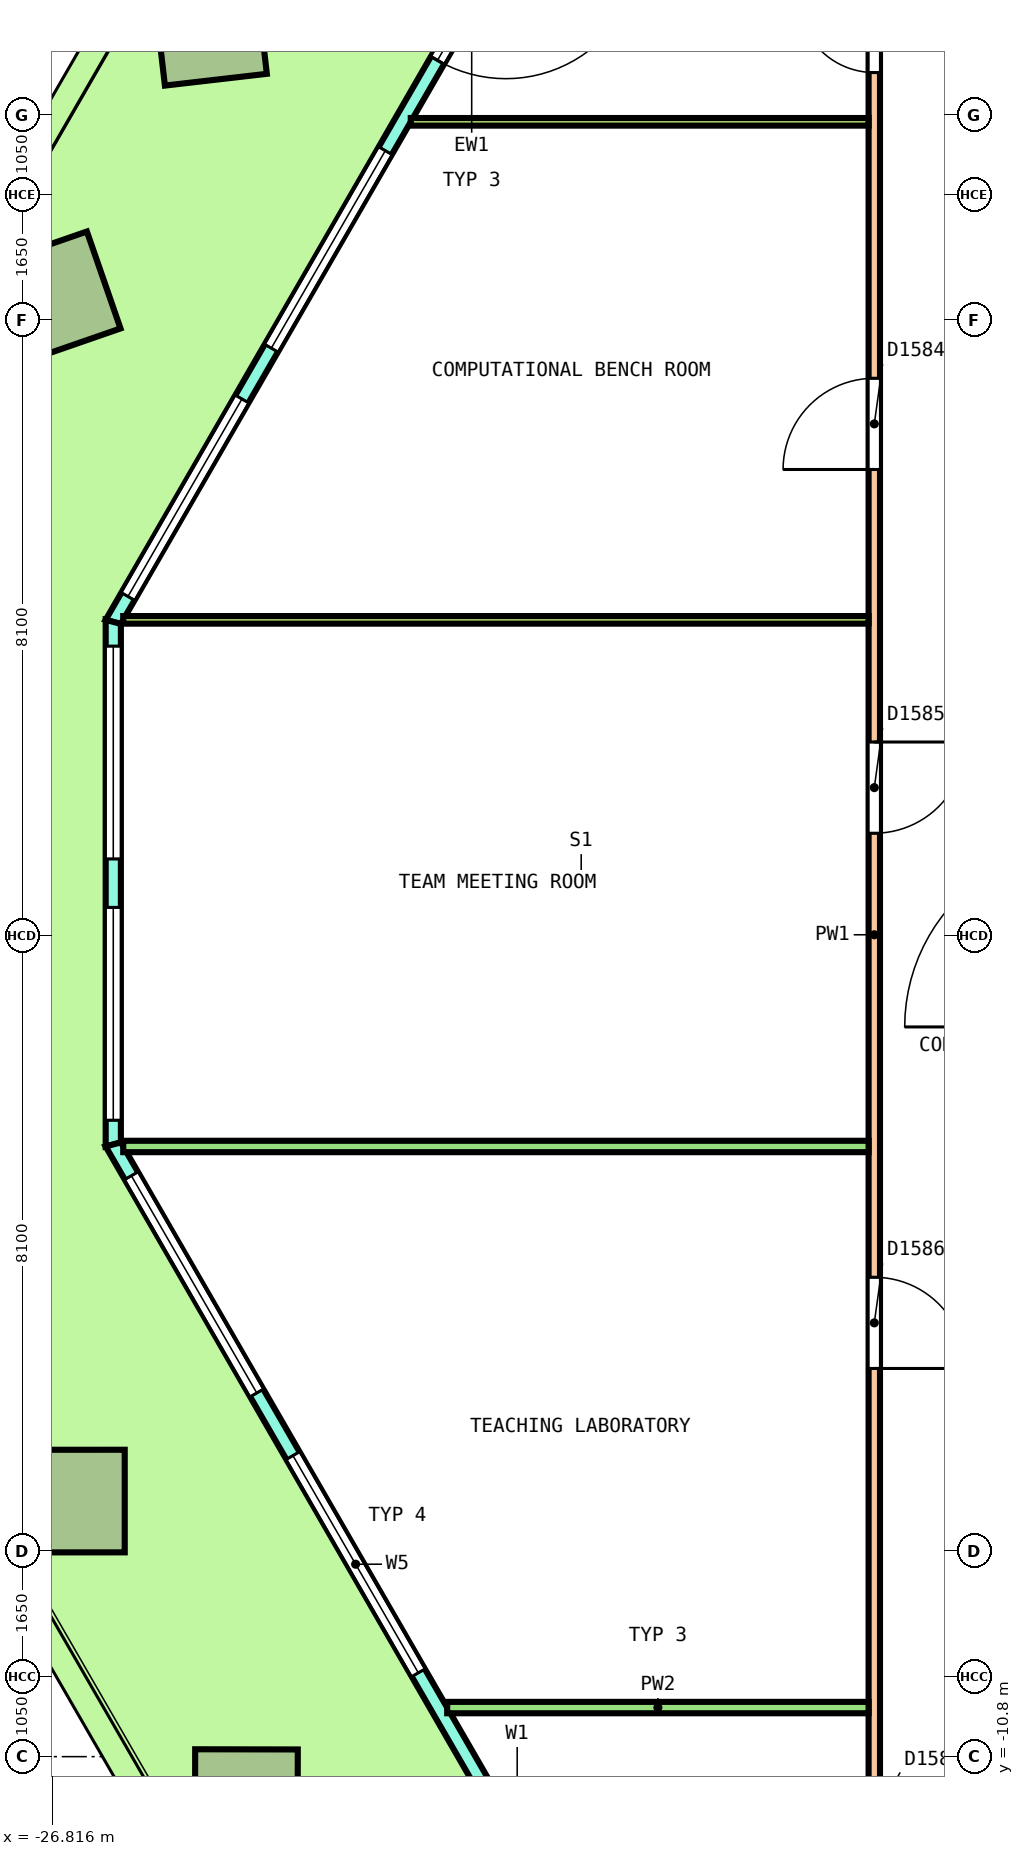
"""IFC4 building model, lengths in metres.
Left out: names, types, materials, properties, quantities, classifications, styles, units other than length and angle.
Written with IfcOpenShell. Run it as: python <this file> out.ifc"""

import sys

from ifc_helpers import new_model, si_unit, direction, frame, frame_2d, origin, origin_2d, place, context, subcontext, project, spatial, polyline, rectangle, outline, extrude, element, fill, save


model = new_model("IFC4")
c1 = context("Model", 3, precision=1e-05, world=origin(), true_north=direction((0.0, 1.0)))
c2 = subcontext(c1, "Body", "Model", "MODEL_VIEW")
j1 = project(units=[si_unit("LENGTHUNIT", "METRE"), si_unit("PLANEANGLEUNIT", "RADIAN")], contexts=[c1])
p1 = place(None, origin())
s1 = spatial("IfcSite", under=j1, at=p1, CompositionType="ELEMENT")
p2 = place(p1, origin())
s2 = spatial("IfcBuilding", under=s1, at=p2, CompositionType="ELEMENT")
p3 = place(p2, frame((0.0, 0.0, 102.8)))
s3 = spatial("IfcBuildingStorey", under=s2, at=p3, CompositionType="ELEMENT", Elevation=102.8)
p4 = place(p3, frame((-24.74, 11.932, 0.0), z_axis=(-0.025365582388, 0.018858497119, 0.999500347332), x_axis=(-0.500693070331, -0.865617296359, 0.003625681545)))
e1 = element("IfcColumn", 1, at=p4, inside=s3, PredefinedType="COLUMN", context=c2, shape_type="SweptSolid", body=[
    extrude(rectangle(XDim=1.35, YDim=1.35, at=origin_2d()), origin(), (0.0, 0.0, 1.0), 4.052),
])
p5 = place(p3, frame((-26.776, 8.406, 0.0), z_axis=(-0.021749357258, 0.025183466299, 0.999446225909), x_axis=(-0.501141721156, -0.865296605573, 0.010897692434)))
e2 = element("IfcColumn", 2, at=p5, inside=s3, PredefinedType="COLUMN", context=c2, shape_type="SweptSolid", body=[
    extrude(rectangle(XDim=1.35, YDim=1.35, at=origin_2d()), origin(), (0.0, 0.0, 1.0), 4.052),
])
p6 = place(p3, frame((-26.536, -7.438, 0.0), z_axis=(-0.010847994403, 0.018863456933, 0.999763217472), x_axis=(0.498562459177, -0.866580616749, 0.02176026136)))
e3 = element("IfcColumn", 3, at=p6, inside=s3, PredefinedType="COLUMN", context=c2, shape_type="SweptSolid", body=[
    extrude(rectangle(XDim=1.35, YDim=1.35, at=origin_2d()), origin(), (0.0, 0.0, 1.0), 4.051),
])
p7 = place(p3, frame((-24.261, -11.379, 0.0), z_axis=(-0.003616759812, 0.006269050341, 0.999973808685), x_axis=(0.498177152713, -0.867045063843, 0.007237525818)))
e4 = element("IfcColumn", 4, at=p7, inside=s3, PredefinedType="COLUMN", context=c2, shape_type="SweptSolid", body=[
    extrude(rectangle(XDim=1.35, YDim=1.35, at=origin_2d()), origin(), (0.0, 0.0, 1.0), 4.05),
])
p8 = place(p3, frame((-16.582, 20.463, 0.0), z_axis=(0.0, 0.0, 1.0), x_axis=(-0.499999588275, -0.866025641494, 0.0)))
e5 = element("IfcWall", 5, at=p8, inside=s3, PredefinedType="SOLIDWALL", context=c2, shape_type="SweptSolid", body=[
    extrude(outline(polyline([(-0.027, -0.1), (1.024, -0.1), (2.075, -0.1), (3.125, -0.1), (4.176, -0.1), (5.227, -0.1), (6.278, -0.1), (7.329, -0.1), (8.38, -0.1), (9.43, -0.1), (10.481, -0.1), (11.532, -0.1), (12.583, -0.1), (13.634, -0.1), (14.685, -0.1), (15.735, -0.1), (16.786, -0.1), (17.837, -0.1), (18.888, -0.1), (18.834, 0.1), (17.789, 0.1), (16.744, 0.1), (15.699, 0.1), (14.655, 0.1), (13.61, 0.1), (12.565, 0.1), (11.52, 0.1), (10.475, 0.1), (9.43, 0.1), (8.385, 0.1), (7.341, 0.1), (6.296, 0.1), (5.251, 0.1), (4.206, 0.1), (3.161, 0.1), (2.116, 0.1), (1.072, 0.1), (0.027, 0.1), (-0.027, -0.1)])), origin(), (0.0, 0.0, 1.0), 4.1),
])
p9 = place(p8, frame((0.386, 0.0, 0.1)))
e6 = element("IfcOpeningElement", 6, at=p9, cuts=e5, PredefinedType="OPENING", context=c2, shape_type="SweptSolid", body=[
    extrude(rectangle(XDim=3.0, YDim=2.9, at=frame_2d((1.5, 1.45))), frame((0.0, 0.11, 0.0), z_axis=(0.0, -1.0, 0.0), x_axis=(1.0, 0.0, 0.0)), (0.0, 0.0, 1.0), 0.22),
])
p10 = place(p8, frame((4.158, 0.0, 0.1)))
e7 = element("IfcOpeningElement", 7, at=p10, cuts=e5, PredefinedType="OPENING", context=c2, shape_type="SweptSolid", body=[
    extrude(rectangle(XDim=3.0, YDim=2.9, at=frame_2d((1.5, 1.45))), frame((0.0, 0.11, 0.0), z_axis=(0.0, -1.0, 0.0), x_axis=(1.0, 0.0, 0.0)), (0.0, 0.0, 1.0), 0.22),
])
p11 = place(p8, frame((8.531, 0.0, 0.0)))
e8 = element("IfcOpeningElement", 8, at=p11, cuts=e5, PredefinedType="OPENING", context=c2, shape_type="SweptSolid", body=[
    extrude(rectangle(XDim=1.8, YDim=2.4, at=frame_2d((0.9, 1.2))), frame((0.0, 0.11, 0.0), z_axis=(0.0, -1.0, 0.0), x_axis=(1.0, 0.0, 0.0)), (0.0, 0.0, 1.0), 0.22),
])
p12 = place(p8, frame((8.531, 0.0, 2.55)))
e9 = element("IfcOpeningElement", 9, at=p12, cuts=e5, PredefinedType="OPENING", context=c2, shape_type="SweptSolid", body=[
    extrude(rectangle(XDim=1.8, YDim=0.45, at=frame_2d((0.9, 0.225))), frame((0.0, 0.11, 0.0), z_axis=(0.0, -1.0, 0.0), x_axis=(1.0, 0.0, 0.0)), (0.0, 0.0, 1.0), 0.22),
])
p13 = place(p8, frame((11.703, 0.0, 0.1)))
e10 = element("IfcOpeningElement", 10, at=p13, cuts=e5, PredefinedType="OPENING", context=c2, shape_type="SweptSolid", body=[
    extrude(rectangle(XDim=3.0, YDim=2.9, at=frame_2d((1.5, 1.45))), frame((0.0, 0.11, 0.0), z_axis=(0.0, -1.0, 0.0), x_axis=(1.0, 0.0, 0.0)), (0.0, 0.0, 1.0), 0.22),
])
p14 = place(p8, frame((15.475, 0.0, 0.1)))
e11 = element("IfcOpeningElement", 11, at=p14, cuts=e5, PredefinedType="OPENING", context=c2, shape_type="SweptSolid", body=[
    extrude(rectangle(XDim=3.0, YDim=2.9, at=frame_2d((1.5, 1.45))), frame((0.0, 0.11, 0.0), z_axis=(0.0, -1.0, 0.0), x_axis=(1.0, 0.0, 0.0)), (0.0, 0.0, 1.0), 0.22),
])
p15 = place(p3, frame((-26.012, 4.129, 0.0), z_axis=(0.0, 0.0, 1.0), x_axis=(0.0, -1.0, 0.0)))
e12 = element("IfcWall", 12, at=p15, inside=s3, PredefinedType="SOLIDWALL", context=c2, shape_type="SweptSolid", body=[
    extrude(outline(polyline([(-0.027, -0.1), (1.128, -0.1), (2.282, -0.1), (3.437, -0.1), (4.592, -0.1), (5.747, -0.1), (6.901, -0.1), (6.848, 0.1), (5.711, 0.1), (4.574, 0.1), (3.437, 0.1), (2.301, 0.1), (1.164, 0.1), (0.027, 0.1), (-0.027, -0.1)])), origin(), (0.0, 0.0, 1.0), 4.1),
])
p16 = place(p15, frame((0.319, 0.0, 0.1)))
e13 = element("IfcOpeningElement", 13, at=p16, cuts=e12, PredefinedType="OPENING", context=c2, shape_type="SweptSolid", body=[
    extrude(rectangle(XDim=2.8, YDim=2.9, at=frame_2d((1.4, 1.45))), frame((0.0, 0.11, 0.0), z_axis=(0.0, -1.0, 0.0), x_axis=(1.0, 0.0, 0.0)), (0.0, 0.0, 1.0), 0.22),
])
p17 = place(p15, frame((3.756, 0.0, 0.1)))
e14 = element("IfcOpeningElement", 14, at=p17, cuts=e12, PredefinedType="OPENING", context=c2, shape_type="SweptSolid", body=[
    extrude(rectangle(XDim=2.8, YDim=2.9, at=frame_2d((1.4, 1.45))), frame((0.0, 0.11, 0.0), z_axis=(0.0, -1.0, 0.0), x_axis=(1.0, 0.0, 0.0)), (0.0, 0.0, 1.0), 0.22),
])
p18 = place(p3, frame((-26.012, -2.746, 0.0), z_axis=(0.0, 0.0, 1.0), x_axis=(0.499998188434, -0.86602644969, 0.0)))
e15 = element("IfcWall", 15, at=p18, inside=s3, PredefinedType="SOLIDWALL", context=c2, shape_type="SweptSolid", body=[
    extrude(outline(polyline([(-0.027, -0.1), (0.988, -0.1), (2.003, -0.1), (3.017, -0.1), (4.032, -0.1), (5.047, -0.1), (6.062, -0.1), (7.076, -0.1), (8.091, -0.1), (9.106, -0.1), (10.121, -0.1), (11.135, -0.1), (12.15, -0.1), (13.165, -0.1), (14.179, -0.1), (15.194, -0.1), (16.209, -0.1), (17.224, -0.1), (18.239, -0.1), (19.253, -0.1), (20.268, -0.1), (21.283, -0.1), (21.229, 0.1), (20.219, 0.1), (19.21, 0.1), (18.2, 0.1), (17.19, 0.1), (16.181, 0.1), (15.171, 0.1), (14.162, 0.1), (13.152, 0.1), (12.142, 0.1), (11.133, 0.1), (10.123, 0.1), (9.114, 0.1), (8.104, 0.1), (7.094, 0.1), (6.085, 0.1), (5.075, 0.1), (4.065, 0.1), (3.056, 0.1), (2.046, 0.1), (1.036, 0.1), (0.027, 0.1), (-0.027, -0.1)])), origin(), (0.0, 0.0, 1.0), 4.1),
])
p19 = place(p18, frame((0.476, 0.0, 0.1)))
e16 = element("IfcOpeningElement", 16, at=p19, cuts=e15, PredefinedType="OPENING", context=c2, shape_type="SweptSolid", body=[
    extrude(rectangle(XDim=3.3, YDim=2.9, at=frame_2d((1.65, 1.45))), frame((0.0, 0.11, 0.0), z_axis=(0.0, -1.0, 0.0), x_axis=(1.0, 0.0, 0.0)), (0.0, 0.0, 1.0), 0.22),
])
p20 = place(p18, frame((4.727, 0.0, 0.1)))
e17 = element("IfcOpeningElement", 17, at=p20, cuts=e15, PredefinedType="OPENING", context=c2, shape_type="SweptSolid", body=[
    extrude(rectangle(XDim=3.3, YDim=2.9, at=frame_2d((1.65, 1.45))), frame((0.0, 0.11, 0.0), z_axis=(0.0, -1.0, 0.0), x_axis=(1.0, 0.0, 0.0)), (0.0, 0.0, 1.0), 0.22),
])
p21 = place(p18, frame((9.728, 0.0, 0.0)))
e18 = element("IfcOpeningElement", 18, at=p21, cuts=e15, PredefinedType="OPENING", context=c2, shape_type="SweptSolid", body=[
    extrude(rectangle(XDim=1.8, YDim=2.4, at=frame_2d((0.9, 1.2))), frame((0.0, 0.11, 0.0), z_axis=(0.0, -1.0, 0.0), x_axis=(1.0, 0.0, 0.0)), (0.0, 0.0, 1.0), 0.22),
])
p22 = place(p18, frame((9.728, 0.0, 2.55)))
e19 = element("IfcOpeningElement", 19, at=p22, cuts=e15, PredefinedType="OPENING", context=c2, shape_type="SweptSolid", body=[
    extrude(rectangle(XDim=1.8, YDim=0.45, at=frame_2d((0.9, 0.225))), frame((0.0, 0.11, 0.0), z_axis=(0.0, -1.0, 0.0), x_axis=(1.0, 0.0, 0.0)), (0.0, 0.0, 1.0), 0.22),
])
p23 = place(p18, frame((13.229, 0.0, 0.1)))
e20 = element("IfcOpeningElement", 20, at=p23, cuts=e15, PredefinedType="OPENING", context=c2, shape_type="SweptSolid", body=[
    extrude(rectangle(XDim=3.3, YDim=2.9, at=frame_2d((1.65, 1.45))), frame((0.0, 0.11, 0.0), z_axis=(0.0, -1.0, 0.0), x_axis=(1.0, 0.0, 0.0)), (0.0, 0.0, 1.0), 0.22),
])
p24 = place(p18, frame((17.48, 0.0, 0.1)))
e21 = element("IfcOpeningElement", 21, at=p24, cuts=e15, PredefinedType="OPENING", context=c2, shape_type="SweptSolid", body=[
    extrude(rectangle(XDim=3.3, YDim=2.9, at=frame_2d((1.65, 1.45))), frame((0.0, 0.11, 0.0), z_axis=(0.0, -1.0, 0.0), x_axis=(1.0, 0.0, 0.0)), (0.0, 0.0, 1.0), 0.22),
])
p25 = place(p3, frame((-16.0, -13.525, 0.0), z_axis=(0.0, 0.0, 1.0), x_axis=(0.0, 1.0, 0.0)))
e22 = element("IfcWall", 22, at=p25, inside=s3, PredefinedType="PARTITIONING", context=c2, shape_type="SweptSolid", body=[
    extrude(rectangle(XDim=27.075, YDim=0.15, at=frame_2d((13.538, 0.0))), origin(), (0.0, 0.0, 1.0), 3.05),
])
p26 = place(p25, frame((24.881, 0.0, 0.0)))
e23 = element("IfcOpeningElement", 23, at=p26, cuts=e22, PredefinedType="OPENING", context=c2, shape_type="SweptSolid", body=[
    extrude(rectangle(XDim=1.0, YDim=2.1, at=frame_2d((0.5, 1.05))), frame((0.0, 0.085, 0.0), z_axis=(0.0, -1.0, 0.0), x_axis=(1.0, 0.0, 0.0)), (0.0, 0.0, 1.0), 0.17),
])
p27 = place(p25, frame((19.659, 0.0, 0.0)))
e24 = element("IfcOpeningElement", 24, at=p27, cuts=e22, PredefinedType="OPENING", context=c2, shape_type="SweptSolid", body=[
    extrude(rectangle(XDim=1.2, YDim=2.1, at=frame_2d((0.6, 1.05))), frame((0.0, 0.085, 0.0), z_axis=(0.0, -1.0, 0.0), x_axis=(1.0, 0.0, 0.0)), (0.0, 0.0, 1.0), 0.17),
])
p28 = place(p25, frame((14.873, 0.0, 0.0)))
e25 = element("IfcOpeningElement", 25, at=p28, cuts=e22, PredefinedType="OPENING", context=c2, shape_type="SweptSolid", body=[
    extrude(rectangle(XDim=1.2, YDim=2.1, at=frame_2d((0.6, 1.05))), frame((0.0, 0.085, 0.0), z_axis=(0.0, -1.0, 0.0), x_axis=(1.0, 0.0, 0.0)), (0.0, 0.0, 1.0), 0.17),
])
p29 = place(p25, frame((7.832, 0.0, 0.0)))
e26 = element("IfcOpeningElement", 26, at=p29, cuts=e22, PredefinedType="OPENING", context=c2, shape_type="SweptSolid", body=[
    extrude(rectangle(XDim=1.2, YDim=2.1, at=frame_2d((0.6, 1.05))), frame((0.0, 0.085, 0.0), z_axis=(0.0, -1.0, 0.0), x_axis=(1.0, 0.0, 0.0)), (0.0, 0.0, 1.0), 0.17),
])
p30 = place(p25, frame((1.409, 0.0, 0.0)))
e27 = element("IfcOpeningElement", 27, at=p30, cuts=e22, PredefinedType="OPENING", context=c2, shape_type="SweptSolid", body=[
    extrude(rectangle(XDim=1.0, YDim=2.1, at=frame_2d((0.5, 1.05))), frame((0.0, 0.085, 0.0), z_axis=(0.0, -1.0, 0.0), x_axis=(1.0, 0.0, 0.0)), (0.0, 0.0, 1.0), 0.17),
])
p31 = place(p3, frame((-25.881, -2.773, 0.0), z_axis=(0.0, 0.0, 1.0), x_axis=(1.0, 0.0, 0.0)))
e28 = element("IfcWall", 28, at=p31, inside=s3, PredefinedType="PARTITIONING", context=c2, shape_type="SweptSolid", body=[
    extrude(rectangle(XDim=9.806, YDim=0.15, at=frame_2d((4.903, 0.0))), origin(), (0.0, 0.0, 1.0), 3.05),
])
p32 = place(p3, frame((-21.619, -10.155, 0.0), z_axis=(0.0, 0.0, 1.0), x_axis=(1.0, 0.0, 0.0)))
e29 = element("IfcWall", 29, at=p32, inside=s3, PredefinedType="PARTITIONING", context=c2, shape_type="SweptSolid", body=[
    extrude(rectangle(XDim=5.544, YDim=0.15, at=frame_2d((2.772, 0.0))), origin(), (0.0, 0.0, 1.0), 3.05),
])
p33 = place(p3, frame((-22.098, 10.708, 0.0), z_axis=(0.0, 0.0, 1.0), x_axis=(1.0, 0.0, 0.0)))
e30 = element("IfcWall", 30, at=p33, inside=s3, PredefinedType="PARTITIONING", context=c2, shape_type="SweptSolid", body=[
    extrude(rectangle(XDim=6.023, YDim=0.1, at=frame_2d((3.012, 0.0))), origin(), (0.0, 0.0, 1.0), 3.05),
])
p34 = place(p3, frame((-25.881, 4.156, 0.0), z_axis=(0.0, 0.0, 1.0), x_axis=(1.0, 0.0, 0.0)))
e31 = element("IfcWall", 31, at=p34, inside=s3, PredefinedType="PARTITIONING", context=c2, shape_type="SweptSolid", body=[
    extrude(rectangle(XDim=9.806, YDim=0.1, at=frame_2d((4.903, 0.0))), origin(), (0.0, 0.0, 1.0), 3.05),
])
p35 = place(p11, origin())
e32 = element("IfcDoor", 32, at=p35, inside=s3, OperationType="DOUBLE_DOOR_SINGLE_SWING", PredefinedType="DOOR", context=c2, shape_type="SweptSolid", body=[
    extrude(rectangle(XDim=1.8, YDim=2.4, at=frame_2d((0.9, 1.2))), frame((0.0, 0.025, 0.0), z_axis=(0.0, -1.0, 0.0), x_axis=(1.0, 0.0, 0.0)), (0.0, 0.0, 1.0), 0.05),
])
fill(e8, e32)
p36 = place(p12, origin())
e33 = element("IfcWindow", 33, at=p36, inside=s3, PartitioningType="SINGLE_PANEL", PredefinedType="WINDOW", context=c2, shape_type="SweptSolid", body=[
    extrude(rectangle(XDim=1.8, YDim=0.45, at=frame_2d((0.9, 0.225))), frame((0.0, 0.03, 0.0), z_axis=(0.0, -1.0, 0.0), x_axis=(1.0, 0.0, 0.0)), (0.0, 0.0, 1.0), 0.06),
])
fill(e9, e33)
p37 = place(p13, origin())
e34 = element("IfcWindow", 34, at=p37, inside=s3, PartitioningType="SINGLE_PANEL", PredefinedType="WINDOW", context=c2, shape_type="SweptSolid", body=[
    extrude(rectangle(XDim=3.0, YDim=2.9, at=frame_2d((1.5, 1.45))), frame((0.0, 0.03, 0.0), z_axis=(0.0, -1.0, 0.0), x_axis=(1.0, 0.0, 0.0)), (0.0, 0.0, 1.0), 0.06),
])
fill(e10, e34)
p38 = place(p14, origin())
e35 = element("IfcWindow", 35, at=p38, inside=s3, PartitioningType="SINGLE_PANEL", PredefinedType="WINDOW", context=c2, shape_type="SweptSolid", body=[
    extrude(rectangle(XDim=3.0, YDim=2.9, at=frame_2d((1.5, 1.45))), frame((0.0, 0.03, 0.0), z_axis=(0.0, -1.0, 0.0), x_axis=(1.0, 0.0, 0.0)), (0.0, 0.0, 1.0), 0.06),
])
fill(e11, e35)
p39 = place(p16, origin())
e36 = element("IfcWindow", 36, at=p39, inside=s3, PartitioningType="SINGLE_PANEL", PredefinedType="WINDOW", context=c2, shape_type="SweptSolid", body=[
    extrude(rectangle(XDim=2.8, YDim=2.9, at=frame_2d((1.4, 1.45))), frame((0.0, 0.03, 0.0), z_axis=(0.0, -1.0, 0.0), x_axis=(1.0, 0.0, 0.0)), (0.0, 0.0, 1.0), 0.06),
])
fill(e13, e36)
p40 = place(p17, origin())
e37 = element("IfcWindow", 37, at=p40, inside=s3, PartitioningType="SINGLE_PANEL", PredefinedType="WINDOW", context=c2, shape_type="SweptSolid", body=[
    extrude(rectangle(XDim=2.8, YDim=2.9, at=frame_2d((1.4, 1.45))), frame((0.0, 0.03, 0.0), z_axis=(0.0, -1.0, 0.0), x_axis=(1.0, 0.0, 0.0)), (0.0, 0.0, 1.0), 0.06),
])
fill(e14, e37)
p41 = place(p19, origin())
e38 = element("IfcWindow", 38, at=p41, inside=s3, PartitioningType="SINGLE_PANEL", PredefinedType="WINDOW", context=c2, shape_type="SweptSolid", body=[
    extrude(rectangle(XDim=3.3, YDim=2.9, at=frame_2d((1.65, 1.45))), frame((0.0, 0.03, 0.0), z_axis=(0.0, -1.0, 0.0), x_axis=(1.0, 0.0, 0.0)), (0.0, 0.0, 1.0), 0.06),
])
fill(e16, e38)
p42 = place(p20, origin())
e39 = element("IfcWindow", 39, at=p42, inside=s3, PartitioningType="SINGLE_PANEL", PredefinedType="WINDOW", context=c2, shape_type="SweptSolid", body=[
    extrude(rectangle(XDim=3.3, YDim=2.9, at=frame_2d((1.65, 1.45))), frame((0.0, 0.03, 0.0), z_axis=(0.0, -1.0, 0.0), x_axis=(1.0, 0.0, 0.0)), (0.0, 0.0, 1.0), 0.06),
])
fill(e17, e39)
p43 = place(p26, origin())
e40 = element("IfcDoor", 40, at=p43, inside=s3, OperationType="SINGLE_SWING_RIGHT", PredefinedType="DOOR", context=c2, shape_type="SweptSolid", body=[
    extrude(rectangle(XDim=1.0, YDim=2.1, at=frame_2d((0.5, 1.05))), frame((0.0, 0.025, 0.0), z_axis=(0.0, -1.0, 0.0), x_axis=(1.0, 0.0, 0.0)), (0.0, 0.0, 1.0), 0.05),
])
fill(e23, e40)
p44 = place(p27, origin())
e41 = element("IfcDoor", 41, at=p44, inside=s3, OperationType="DOUBLE_DOOR_SINGLE_SWING", PredefinedType="DOOR", context=c2, shape_type="SweptSolid", body=[
    extrude(rectangle(XDim=1.2, YDim=2.1, at=frame_2d((0.6, 1.05))), frame((0.0, 0.025, 0.0), z_axis=(0.0, -1.0, 0.0), x_axis=(1.0, 0.0, 0.0)), (0.0, 0.0, 1.0), 0.05),
])
fill(e24, e41)
p45 = place(p28, origin())
e42 = element("IfcDoor", 42, at=p45, inside=s3, OperationType="DOUBLE_DOOR_SINGLE_SWING", PredefinedType="DOOR", context=c2, shape_type="SweptSolid", body=[
    extrude(rectangle(XDim=1.2, YDim=2.1, at=frame_2d((0.6, 1.05))), frame((0.0, 0.025, 0.0), z_axis=(0.0, -1.0, 0.0), x_axis=(1.0, 0.0, 0.0)), (0.0, 0.0, 1.0), 0.05),
])
fill(e25, e42)
p46 = place(p29, origin())
e43 = element("IfcDoor", 43, at=p46, inside=s3, OperationType="DOUBLE_DOOR_SINGLE_SWING", PredefinedType="DOOR", context=c2, shape_type="SweptSolid", body=[
    extrude(rectangle(XDim=1.2, YDim=2.1, at=frame_2d((0.6, 1.05))), frame((0.0, 0.025, 0.0), z_axis=(0.0, -1.0, 0.0), x_axis=(1.0, 0.0, 0.0)), (0.0, 0.0, 1.0), 0.05),
])
fill(e26, e43)
save(model, sys.argv[1])
